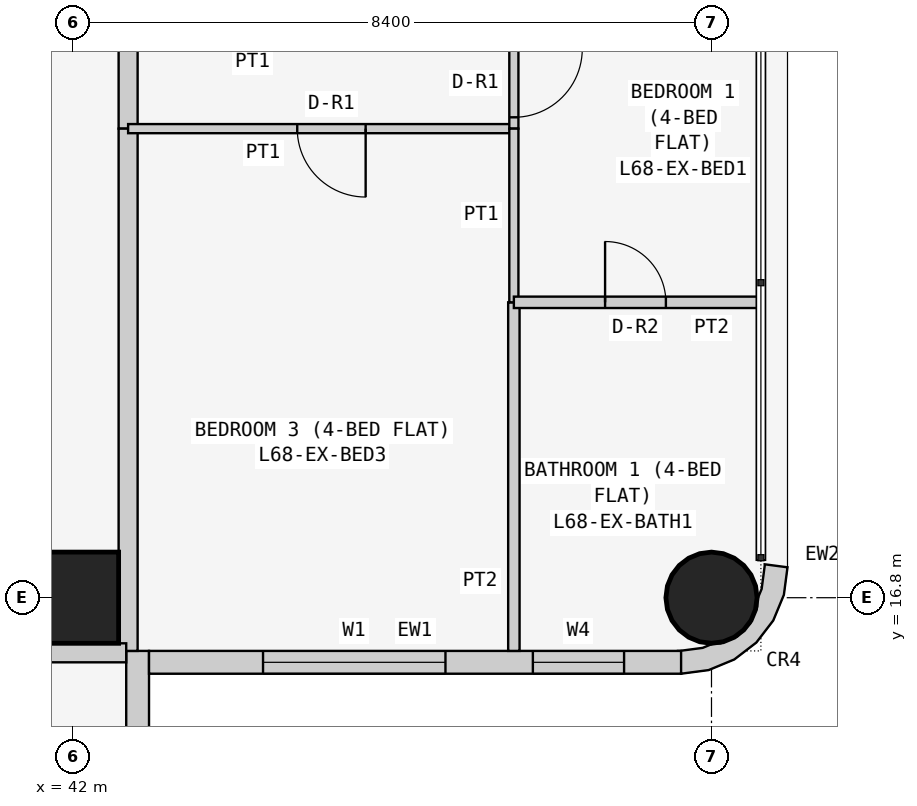
"""IFC4 building model, lengths in metres.
Left out: names, types, materials, properties, quantities, classifications, styles, units other than length and angle.
Written with IfcOpenShell. Run it as: python <this file> out.ifc"""

import sys

from ifc_helpers import new_model, si_unit, direction, frame, frame_2d, origin, origin_2d, place, context, subcontext, project, spatial, polyline, rectangle, circle, outline, extrude, element, fill, save


model = new_model("IFC4")
c1 = context("Model", 3, precision=1e-05, world=origin(), true_north=direction((0.0, 1.0)))
c2 = subcontext(c1, "Body", "Model", "MODEL_VIEW")
j1 = project(units=[si_unit("LENGTHUNIT", "METRE"), si_unit("PLANEANGLEUNIT", "RADIAN")], contexts=[c1])
p1 = place(None, origin())
s1 = spatial("IfcSite", under=j1, at=p1, CompositionType="ELEMENT")
p2 = place(p1, origin())
s2 = spatial("IfcBuilding", under=s1, at=p2, CompositionType="ELEMENT")
p3 = place(p2, frame((0.0, 0.0, 261.3)))
s3 = spatial("IfcBuildingStorey", under=s2, at=p3, CompositionType="ELEMENT", Elevation=261.3)
p4 = place(p3, frame((42.0, 16.8, 0.0), z_axis=(0.0, 0.0, 1.0), x_axis=(1.0, 0.0, 0.0)))
e1 = element("IfcColumn", 1, at=p4, inside=s3, PredefinedType="COLUMN", context=c2, shape_type="SweptSolid", body=[
    extrude(rectangle(XDim=1.2, YDim=1.2, at=origin_2d()), origin(), (0.0, 0.0, 1.0), 3.6),
])
p5 = place(p3, frame((50.4, 16.8, 0.0), z_axis=(0.0, 0.0, 1.0), x_axis=(1.0, 0.0, 0.0)))
e2 = element("IfcColumn", 2, at=p5, inside=s3, PredefinedType="COLUMN", context=c2, shape_type="SweptSolid", body=[
    extrude(circle(Radius=0.6, at=origin_2d()), origin(), (0.0, 0.0, 1.0), 3.6),
])
p6 = place(p3, frame((42.85, 8.8, 0.0), z_axis=(0.0, 0.0, 1.0), x_axis=(0.0, 1.0, 0.0)))
e3 = element("IfcWall", 3, at=p6, inside=s3, PredefinedType="SOLIDWALL", context=c2, shape_type="SweptSolid", body=[
    extrude(rectangle(XDim=7.3, YDim=0.3, at=frame_2d((3.65, 0.0))), origin(), (0.0, 0.0, 1.0), 3.45),
])
p7 = place(p6, frame((3.1, 0.0, 0.9)))
e4 = element("IfcOpeningElement", 4, at=p7, cuts=e3, PredefinedType="OPENING", context=c2, shape_type="SweptSolid", body=[
    extrude(rectangle(XDim=2.4, YDim=1.5, at=frame_2d((1.2, 0.75))), frame((0.0, 0.16, 0.0), z_axis=(0.0, -1.0, 0.0), x_axis=(1.0, 0.0, 0.0)), (0.0, 0.0, 1.0), 0.32),
])
p8 = place(p6, frame((0.75, 0.0, 0.9)))
e5 = element("IfcOpeningElement", 5, at=p8, cuts=e3, PredefinedType="OPENING", context=c2, shape_type="SweptSolid", body=[
    extrude(rectangle(XDim=1.2, YDim=1.5, at=frame_2d((0.6, 0.75))), frame((0.0, 0.16, 0.0), z_axis=(0.0, -1.0, 0.0), x_axis=(1.0, 0.0, 0.0)), (0.0, 0.0, 1.0), 0.32),
])
p9 = place(p3, frame((43.0, 15.95, 0.0), z_axis=(0.0, 0.0, 1.0), x_axis=(1.0, 0.0, 0.0)))
e6 = element("IfcWall", 6, at=p9, inside=s3, PredefinedType="SOLIDWALL", context=c2, shape_type="SweptSolid", body=[
    extrude(rectangle(XDim=7.0, YDim=0.3, at=frame_2d((3.5, 0.0))), origin(), (0.0, 0.0, 1.0), 3.45),
])
p10 = place(p9, frame((1.5, 0.0, 0.9)))
e7 = element("IfcOpeningElement", 7, at=p10, cuts=e6, PredefinedType="OPENING", context=c2, shape_type="SweptSolid", body=[
    extrude(rectangle(XDim=2.4, YDim=1.5, at=frame_2d((1.2, 0.75))), frame((0.0, 0.16, 0.0), z_axis=(0.0, -1.0, 0.0), x_axis=(1.0, 0.0, 0.0)), (0.0, 0.0, 1.0), 0.32),
])
p11 = place(p9, frame((5.05, 0.0, 0.9)))
e8 = element("IfcOpeningElement", 8, at=p11, cuts=e6, PredefinedType="OPENING", context=c2, shape_type="SweptSolid", body=[
    extrude(rectangle(XDim=1.2, YDim=1.5, at=frame_2d((0.6, 0.75))), frame((0.0, 0.16, 0.0), z_axis=(0.0, -1.0, 0.0), x_axis=(1.0, 0.0, 0.0)), (0.0, 0.0, 1.0), 0.32),
])
p12 = place(p3, frame((50.038, 16.224, 0.0), z_axis=(0.0, 0.0, 1.0), x_axis=(0.707106781187, -0.707106781187, 0.0)))
e9 = element("IfcWall", 9, at=p12, inside=s3, PredefinedType="SOLIDWALL", context=c2, shape_type="SweptSolid", body=[
    extrude(outline(polyline([(0.047, 1.455), (0.233, 1.212), (0.292, 1.069), (0.358, 1.003), (0.449, 0.782), (0.449, 0.543), (0.358, 0.322), (0.292, 0.257), (0.233, 0.114), (0.047, -0.129), (0.033, -0.143), (0.273, -0.327), (0.495, -0.037), (0.635, 0.301), (0.683, 0.663), (0.635, 1.025), (0.495, 1.363), (0.273, 1.653), (0.033, 1.469), (0.047, 1.455)])), origin(), (0.0, 0.0, 1.0), 3.45),
])
p13 = place(p3, frame((42.725, 24.171, 0.0), z_axis=(0.0, 0.0, 1.0), x_axis=(0.0, -1.0, 0.0)))
e10 = element("IfcWall", 10, at=p13, inside=s3, PredefinedType="PARTITIONING", context=c2, shape_type="SweptSolid", body=[
    extrude(rectangle(XDim=1.2, YDim=0.25, at=frame_2d((0.6, 0.0))), origin(), (0.0, 0.0, 1.0), 3.45),
])
for number, where, z_axis, x_axis in (
    (11, (42.725, 22.971, 0.0), (0.0, 0.0, 1.0), (0.0, -1.0, 0.0)),
    (12, (42.7, 16.075, 0.0), (0.0, 0.0, 1.0), (-1.0, 0.0, 0.0)),
):
    element("IfcWall", number, at=place(p3, frame(where, z_axis=z_axis, x_axis=x_axis)), inside=s3, PredefinedType="PARTITIONING", context=c2, shape_type="SweptSolid", body=[
        extrude(rectangle(XDim=6.871, YDim=0.25, at=frame_2d((3.436, 0.0))), origin(), (0.0, 0.0, 1.0), 3.45),
    ])
p14 = place(p3, frame((47.8, 22.971, 0.0), z_axis=(0.0, 0.0, 1.0), x_axis=(-1.0, 0.0, 0.0)))
e13 = element("IfcWall", 13, at=p14, inside=s3, PredefinedType="PARTITIONING", context=c2, shape_type="SweptSolid", body=[
    extrude(rectangle(XDim=5.075, YDim=0.12, at=frame_2d((2.538, 0.0))), origin(), (0.0, 0.0, 1.0), 3.45),
])
p15 = place(p14, frame((1.95, 0.0, 0.0)))
e14 = element("IfcOpeningElement", 14, at=p15, cuts=e13, PredefinedType="OPENING", context=c2, shape_type="SweptSolid", body=[
    extrude(rectangle(XDim=0.9, YDim=2.1, at=frame_2d((0.45, 1.05))), frame((0.0, 0.07, 0.0), z_axis=(0.0, -1.0, 0.0), x_axis=(1.0, 0.0, 0.0)), (0.0, 0.0, 1.0), 0.14),
])
p16 = place(p3, frame((47.8, 24.171, 0.0), z_axis=(0.0, 0.0, 1.0), x_axis=(0.0, -1.0, 0.0)))
e15 = element("IfcWall", 15, at=p16, inside=s3, PredefinedType="PARTITIONING", context=c2, shape_type="SweptSolid", body=[
    extrude(rectangle(XDim=1.2, YDim=0.12, at=frame_2d((0.6, 0.0))), origin(), (0.0, 0.0, 1.0), 3.45),
])
p17 = place(p16, frame((0.151, 0.0, 0.0)))
e16 = element("IfcOpeningElement", 16, at=p17, cuts=e15, PredefinedType="OPENING", context=c2, shape_type="SweptSolid", body=[
    extrude(rectangle(XDim=0.9, YDim=2.1, at=frame_2d((0.45, 1.05))), frame((0.0, 0.07, 0.0), z_axis=(0.0, -1.0, 0.0), x_axis=(1.0, 0.0, 0.0)), (0.0, 0.0, 1.0), 0.14),
])
p18 = place(p3, frame((47.8, 16.1, 0.0), z_axis=(0.0, 0.0, 1.0), x_axis=(0.0, 1.0, 0.0)))
e17 = element("IfcWall", 17, at=p18, inside=s3, PredefinedType="PARTITIONING", context=c2, shape_type="SweptSolid", body=[
    extrude(rectangle(XDim=4.586, YDim=0.15, at=frame_2d((2.293, 0.0))), origin(), (0.0, 0.0, 1.0), 3.45),
])
p19 = place(p3, frame((47.8, 20.686, 0.0), z_axis=(0.0, 0.0, 1.0), x_axis=(0.0, 1.0, 0.0)))
e18 = element("IfcWall", 18, at=p19, inside=s3, PredefinedType="PARTITIONING", context=c2, shape_type="SweptSolid", body=[
    extrude(rectangle(XDim=2.285, YDim=0.12, at=frame_2d((1.143, 0.0))), origin(), (0.0, 0.0, 1.0), 3.45),
])
p20 = place(p3, frame((51.05, 20.686, 0.0), z_axis=(0.0, 0.0, 1.0), x_axis=(-1.0, 0.0, 0.0)))
e19 = element("IfcWall", 19, at=p20, inside=s3, PredefinedType="PARTITIONING", context=c2, shape_type="SweptSolid", body=[
    extrude(rectangle(XDim=3.25, YDim=0.15, at=frame_2d((1.625, 0.0))), origin(), (0.0, 0.0, 1.0), 3.45),
])
p21 = place(p20, frame((1.25, 0.0, 0.0)))
e20 = element("IfcOpeningElement", 20, at=p21, cuts=e19, PredefinedType="OPENING", context=c2, shape_type="SweptSolid", body=[
    extrude(rectangle(XDim=0.8, YDim=2.1, at=frame_2d((0.4, 1.05))), frame((0.0, 0.085, 0.0), z_axis=(0.0, -1.0, 0.0), x_axis=(1.0, 0.0, 0.0)), (0.0, 0.0, 1.0), 0.17),
])
p22 = place(p10, origin())
e21 = element("IfcWindow", 21, at=p22, inside=s3, PartitioningType="SINGLE_PANEL", PredefinedType="WINDOW", context=c2, shape_type="SweptSolid", body=[
    extrude(rectangle(XDim=2.4, YDim=1.5, at=frame_2d((1.2, 0.75))), frame((0.0, 0.03, 0.0), z_axis=(0.0, -1.0, 0.0), x_axis=(1.0, 0.0, 0.0)), (0.0, 0.0, 1.0), 0.06),
])
fill(e7, e21)
p23 = place(p11, origin())
e22 = element("IfcWindow", 22, at=p23, inside=s3, PartitioningType="SINGLE_PANEL", PredefinedType="WINDOW", context=c2, shape_type="SweptSolid", body=[
    extrude(rectangle(XDim=1.2, YDim=1.5, at=frame_2d((0.6, 0.75))), frame((0.0, 0.03, 0.0), z_axis=(0.0, -1.0, 0.0), x_axis=(1.0, 0.0, 0.0)), (0.0, 0.0, 1.0), 0.06),
])
fill(e8, e22)
p24 = place(p15, origin())
e23 = element("IfcDoor", 23, at=p24, inside=s3, OperationType="SINGLE_SWING_LEFT", PredefinedType="DOOR", context=c2, shape_type="SweptSolid", body=[
    extrude(rectangle(XDim=0.9, YDim=2.1, at=frame_2d((0.45, 1.05))), frame((0.0, 0.025, 0.0), z_axis=(0.0, -1.0, 0.0), x_axis=(1.0, 0.0, 0.0)), (0.0, 0.0, 1.0), 0.05),
])
fill(e14, e23)
p25 = place(p17, origin())
e24 = element("IfcDoor", 24, at=p25, inside=s3, OperationType="SINGLE_SWING_LEFT", PredefinedType="DOOR", context=c2, shape_type="SweptSolid", body=[
    extrude(rectangle(XDim=0.9, YDim=2.1, at=frame_2d((0.45, 1.05))), frame((0.0, 0.025, 0.0), z_axis=(0.0, -1.0, 0.0), x_axis=(1.0, 0.0, 0.0)), (0.0, 0.0, 1.0), 0.05),
])
fill(e16, e24)
p26 = place(p21, frame((0.8, 0.0, 0.0), z_axis=(0.0, 0.0, 1.0), x_axis=(-1.0, 0.0, 0.0)))
e25 = element("IfcDoor", 25, at=p26, inside=s3, OperationType="SINGLE_SWING_LEFT", PredefinedType="DOOR", context=c2, shape_type="SweptSolid", body=[
    extrude(rectangle(XDim=0.8, YDim=2.1, at=frame_2d((0.4, 1.05))), frame((0.0, 0.025, 0.0), z_axis=(0.0, -1.0, 0.0), x_axis=(1.0, 0.0, 0.0)), (0.0, 0.0, 1.0), 0.05),
])
fill(e20, e25)
save(model, sys.argv[1])
